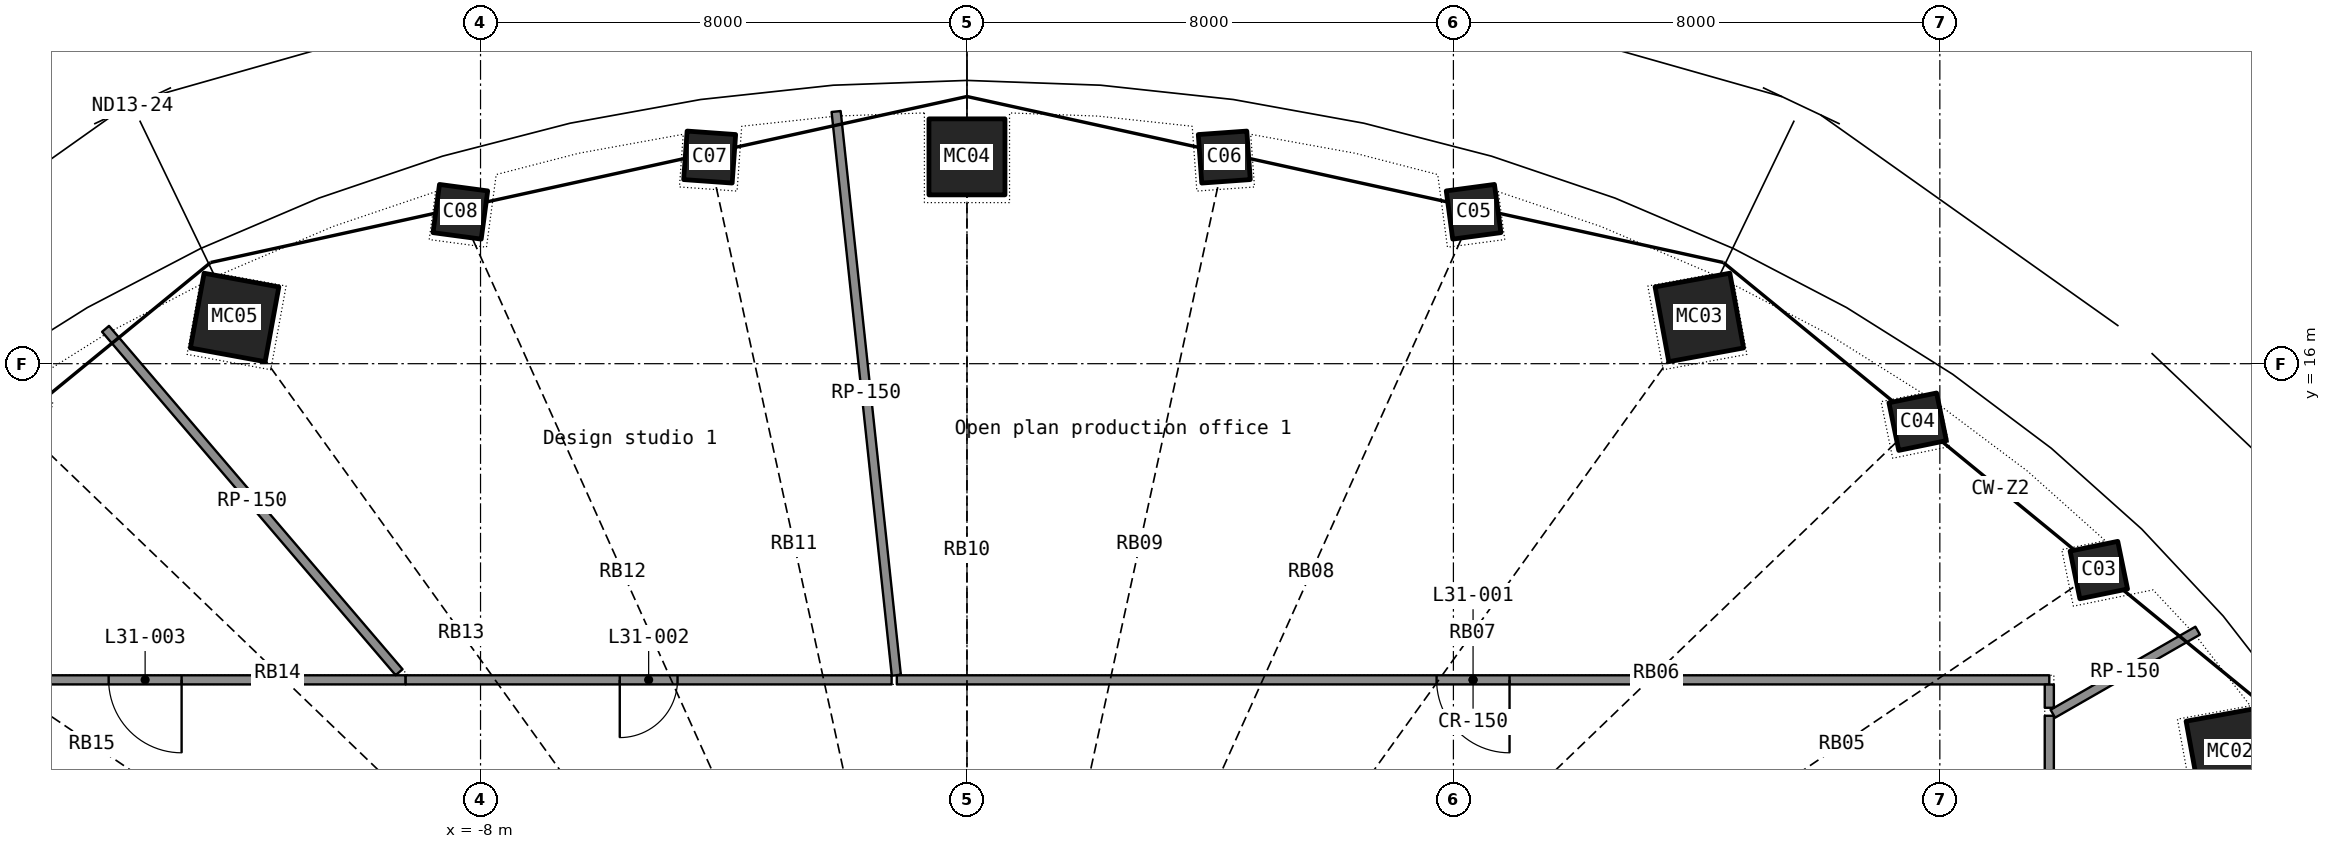
"""IFC4 building model, lengths in metres.
Left out: names, types, materials, properties, quantities, classifications, styles, units other than length and angle.
Written with IfcOpenShell. Run it as: python <this file> out.ifc"""

import sys

from ifc_helpers import new_model, si_unit, direction, frame, frame_2d, origin, origin_2d, place, context, subcontext, project, spatial, rectangle, hollow_rectangle, extrude, element, fill, save


model = new_model("IFC4")
c1 = context("Model", 3, precision=1e-05, world=origin(), true_north=direction((0.0, 1.0)))
c2 = subcontext(c1, "Body", "Model", "MODEL_VIEW")
j1 = project(units=[si_unit("LENGTHUNIT", "METRE"), si_unit("PLANEANGLEUNIT", "RADIAN")], contexts=[c1])
p1 = place(None, origin())
s1 = spatial("IfcSite", under=j1, at=p1, CompositionType="ELEMENT")
p2 = place(p1, origin())
s2 = spatial("IfcBuilding", under=s1, at=p2, CompositionType="ELEMENT")
p3 = place(p2, frame((0.0, 0.0, 130.4)))
s3 = spatial("IfcBuildingStorey", under=s2, at=p3, CompositionType="ELEMENT", Elevation=130.4)
p4 = place(p3, frame((20.777, 9.617, 0.0), z_axis=(-0.029938693, -0.014178016, 0.999451179), x_axis=(0.583179319, -0.812321691, 0.00594578)))
e1 = element("IfcColumn", 1, at=p4, inside=s3, PredefinedType="COLUMN", context=c2, shape_type="SweptSolid", body=[
    extrude(hollow_rectangle(XDim=1.25, YDim=1.25, WallThickness=0.032, at=origin_2d()), origin(), (0.0, 0.0, 1.0), 3.702),
])
p5 = place(p3, frame((18.615, 12.606, 0.0), z_axis=(-0.026510431, -0.018201192, 0.999482823), x_axis=(0.719947485, -0.693998498, 0.006457858)))
e2 = element("IfcColumn", 2, at=p5, inside=s3, PredefinedType="COLUMN", context=c2, shape_type="SweptSolid", body=[
    extrude(hollow_rectangle(XDim=0.8, YDim=0.8, WallThickness=0.025, at=origin_2d()), origin(), (0.0, 0.0, 1.0), 3.702),
])
p6 = place(p3, frame((15.635, 15.046, 0.0), z_axis=(-0.02222469, -0.021697101, 0.999517533), x_axis=(0.828096542, -0.560550728, 0.006244876)))
e3 = element("IfcColumn", 3, at=p6, inside=s3, PredefinedType="COLUMN", context=c2, shape_type="SweptSolid", body=[
    extrude(hollow_rectangle(XDim=0.8, YDim=0.8, WallThickness=0.025, at=origin_2d()), origin(), (0.0, 0.0, 1.0), 3.702),
])
p7 = place(p3, frame((12.044, 16.76, 0.0), z_axis=(-0.017279098, -0.024533681, 0.999549664), x_axis=(0.907978887, -0.418980963, 0.005412348)))
e4 = element("IfcColumn", 4, at=p7, inside=s3, PredefinedType="COLUMN", context=c2, shape_type="SweptSolid", body=[
    extrude(hollow_rectangle(XDim=1.25, YDim=1.25, WallThickness=0.032, at=origin_2d()), origin(), (0.0, 0.0, 1.0), 3.702),
])
for number, where, z_axis, x_axis in (
    (5, (8.332, 18.499, 0.0), (-0.012, -0.027, 1.0), (0.96, -0.28, 0.004)),
    (6, (4.232, 19.398, 0.0), (-0.006, -0.028, 1.0), (0.99, -0.14, 0.002)),
):
    element("IfcColumn", number, at=place(p3, frame(where, z_axis=z_axis, x_axis=x_axis)), inside=s3, PredefinedType="COLUMN", context=c2, shape_type="SweptSolid", body=[
        extrude(hollow_rectangle(XDim=0.8, YDim=0.8, WallThickness=0.025, at=origin_2d()), origin(), (0.0, 0.0, 1.0), 3.702),
    ])
p8 = place(p3, frame((0.0, 19.402, 0.0), z_axis=(0.0, -0.02836019, 0.999597769), x_axis=(1.0, 0.0, 0.0)))
e7 = element("IfcColumn", 7, at=p8, inside=s3, PredefinedType="COLUMN", context=c2, shape_type="SweptSolid", body=[
    extrude(hollow_rectangle(XDim=1.25, YDim=1.25, WallThickness=0.032, at=origin_2d()), origin(), (0.0, 0.0, 1.0), 3.702),
])
for number, where, z_axis, x_axis in (
    (8, (-4.232, 19.398, 0.0), (0.006, -0.028, 1.0), (0.99, 0.14, -0.002)),
    (9, (-8.332, 18.499, 0.0), (0.012, -0.027, 1.0), (0.96, 0.28, -0.004)),
):
    element("IfcColumn", number, at=place(p3, frame(where, z_axis=z_axis, x_axis=x_axis)), inside=s3, PredefinedType="COLUMN", context=c2, shape_type="SweptSolid", body=[
        extrude(hollow_rectangle(XDim=0.8, YDim=0.8, WallThickness=0.025, at=origin_2d()), origin(), (0.0, 0.0, 1.0), 3.702),
    ])
p9 = place(p3, frame((-12.044, 16.76, 0.0), z_axis=(0.017279098, -0.024533681, 0.999549664), x_axis=(0.907978887, 0.418980963, -0.005412348)))
e10 = element("IfcColumn", 10, at=p9, inside=s3, PredefinedType="COLUMN", context=c2, shape_type="SweptSolid", body=[
    extrude(hollow_rectangle(XDim=1.25, YDim=1.25, WallThickness=0.032, at=origin_2d()), origin(), (0.0, 0.0, 1.0), 3.702),
])
p10 = place(p3, frame((-15.635, 15.046, 0.0), z_axis=(0.02222469, -0.021697101, 0.999517533), x_axis=(0.828096542, 0.560550728, -0.006244876)))
e11 = element("IfcColumn", 11, at=p10, inside=s3, PredefinedType="COLUMN", context=c2, shape_type="SweptSolid", body=[
    extrude(hollow_rectangle(XDim=0.8, YDim=0.8, WallThickness=0.025, at=origin_2d()), origin(), (0.0, 0.0, 1.0), 3.702),
])
p11 = place(p3, frame((17.8, 10.8, 0.0), z_axis=(0.0, 0.0, 1.0), x_axis=(-1.0, 0.0, 0.0)))
e12 = element("IfcWall", 12, at=p11, inside=s3, PredefinedType="PARTITIONING", context=c2, shape_type="SweptSolid", body=[
    extrude(rectangle(XDim=18.954, YDim=0.15, at=frame_2d((9.477, 0.0))), origin(), (0.0, 0.0, 1.0), 2.4),
])
p12 = place(p11, frame((8.877, 0.0, 0.0)))
e13 = element("IfcOpeningElement", 13, at=p12, cuts=e12, PredefinedType="OPENING", context=c2, shape_type="SweptSolid", body=[
    extrude(rectangle(XDim=1.2, YDim=2.2, at=frame_2d((0.6, 1.1))), frame((0.0, 0.085, 0.0), z_axis=(0.0, -1.0, 0.0), x_axis=(1.0, 0.0, 0.0)), (0.0, 0.0, 1.0), 0.17),
])
p13 = place(p3, frame((-2.152, 20.148, 0.0), z_axis=(0.0, 0.0, 1.0), x_axis=(0.106226181, -0.994341993, 0.0)))
e14 = element("IfcWall", 14, at=p13, inside=s3, PredefinedType="PARTITIONING", context=c2, shape_type="SweptSolid", body=[
    extrude(rectangle(XDim=9.324, YDim=0.15, at=frame_2d((4.662, 0.0))), origin(), (0.0, 0.0, 1.0), 2.4),
])
p14 = place(p3, frame((-9.232, 10.8, 0.0), z_axis=(0.0, 0.0, 1.0), x_axis=(-1.0, 0.0, 0.0)))
e15 = element("IfcWall", 15, at=p14, inside=s3, PredefinedType="PARTITIONING", context=c2, shape_type="SweptSolid", body=[
    extrude(rectangle(XDim=8.568, YDim=0.15, at=frame_2d((4.284, 0.0))), origin(), (0.0, 0.0, 1.0), 2.4),
])
p15 = place(p14, frame((3.684, 0.0, 0.0)))
e16 = element("IfcOpeningElement", 16, at=p15, cuts=e15, PredefinedType="OPENING", context=c2, shape_type="SweptSolid", body=[
    extrude(rectangle(XDim=1.2, YDim=2.2, at=frame_2d((0.6, 1.1))), frame((0.0, 0.085, 0.0), z_axis=(0.0, -1.0, 0.0), x_axis=(1.0, 0.0, 0.0)), (0.0, 0.0, 1.0), 0.17),
])
p16 = place(p3, frame((-1.239, 10.8, 0.0), z_axis=(0.0, 0.0, 1.0), x_axis=(-1.0, 0.0, 0.0)))
e17 = element("IfcWall", 17, at=p16, inside=s3, PredefinedType="PARTITIONING", context=c2, shape_type="SweptSolid", body=[
    extrude(rectangle(XDim=7.992, YDim=0.15, at=frame_2d((3.996, 0.0))), origin(), (0.0, 0.0, 1.0), 2.4),
])
p17 = place(p16, frame((3.521, 0.0, 0.0)))
e18 = element("IfcOpeningElement", 18, at=p17, cuts=e17, PredefinedType="OPENING", context=c2, shape_type="SweptSolid", body=[
    extrude(rectangle(XDim=0.95, YDim=2.15, at=frame_2d((0.475, 1.075))), frame((0.0, 0.085, 0.0), z_axis=(0.0, -1.0, 0.0), x_axis=(1.0, 0.0, 0.0)), (0.0, 0.0, 1.0), 0.17),
])
p18 = place(p3, frame((-14.167, 16.573, 0.0), z_axis=(0.0, 0.0, 1.0), x_axis=(0.64976247, -0.760137312, 0.0)))
e19 = element("IfcWall", 19, at=p18, inside=s3, PredefinedType="PARTITIONING", context=c2, shape_type="SweptSolid", body=[
    extrude(rectangle(XDim=7.43, YDim=0.15, at=frame_2d((3.715, 0.0))), origin(), (0.0, 0.0, 1.0), 2.4),
])
p19 = place(p3, frame((17.8, 7.188, 0.0), z_axis=(0.0, 0.0, 1.0), x_axis=(0.0, 1.0, 0.0)))
e20 = element("IfcWall", 20, at=p19, inside=s3, PredefinedType="PARTITIONING", context=c2, shape_type="SweptSolid", body=[
    extrude(rectangle(XDim=3.021, YDim=0.15, at=frame_2d((1.511, 0.0))), origin(), (0.0, 0.0, 1.0), 2.4),
])
p20 = place(p3, frame((17.858, 10.243, 0.0), z_axis=(0.0, 0.0, 1.0), x_axis=(0.867454205, 0.497517037, 0.0)))
e21 = element("IfcWall", 21, at=p20, inside=s3, PredefinedType="PARTITIONING", context=c2, shape_type="SweptSolid", body=[
    extrude(rectangle(XDim=2.746, YDim=0.15, at=frame_2d((1.373, 0.0))), origin(), (0.0, 0.0, 1.0), 2.4),
])
p21 = place(p3, frame((17.8, 10.341, 0.0), z_axis=(0.0, 0.0, 1.0), x_axis=(0.0, 1.0, 0.0)))
e22 = element("IfcWall", 22, at=p21, inside=s3, PredefinedType="PARTITIONING", context=c2, shape_type="SweptSolid", body=[
    extrude(rectangle(XDim=0.382, YDim=0.15, at=frame_2d((0.191, 0.0))), origin(), (0.0, 0.0, 1.0), 2.4),
])
p22 = place(p12, origin())
e23 = element("IfcDoor", 23, at=p22, inside=s3, OperationType="DOUBLE_DOOR_SINGLE_SWING", PredefinedType="DOOR", context=c2, shape_type="SweptSolid", body=[
    extrude(rectangle(XDim=1.2, YDim=2.2, at=frame_2d((0.6, 1.1))), frame((0.0, 0.025, 0.0), z_axis=(0.0, -1.0, 0.0), x_axis=(1.0, 0.0, 0.0)), (0.0, 0.0, 1.0), 0.05),
])
fill(e13, e23)
p23 = place(p17, origin())
e24 = element("IfcDoor", 24, at=p23, inside=s3, OperationType="SINGLE_SWING_RIGHT", PredefinedType="DOOR", context=c2, shape_type="SweptSolid", body=[
    extrude(rectangle(XDim=0.95, YDim=2.15, at=frame_2d((0.475, 1.075))), frame((0.0, 0.025, 0.0), z_axis=(0.0, -1.0, 0.0), x_axis=(1.0, 0.0, 0.0)), (0.0, 0.0, 1.0), 0.05),
])
fill(e18, e24)
p24 = place(p15, origin())
e25 = element("IfcDoor", 25, at=p24, inside=s3, OperationType="DOUBLE_DOOR_SINGLE_SWING", PredefinedType="DOOR", context=c2, shape_type="SweptSolid", body=[
    extrude(rectangle(XDim=1.2, YDim=2.2, at=frame_2d((0.6, 1.1))), frame((0.0, 0.025, 0.0), z_axis=(0.0, -1.0, 0.0), x_axis=(1.0, 0.0, 0.0)), (0.0, 0.0, 1.0), 0.05),
])
fill(e16, e25)
save(model, sys.argv[1])
